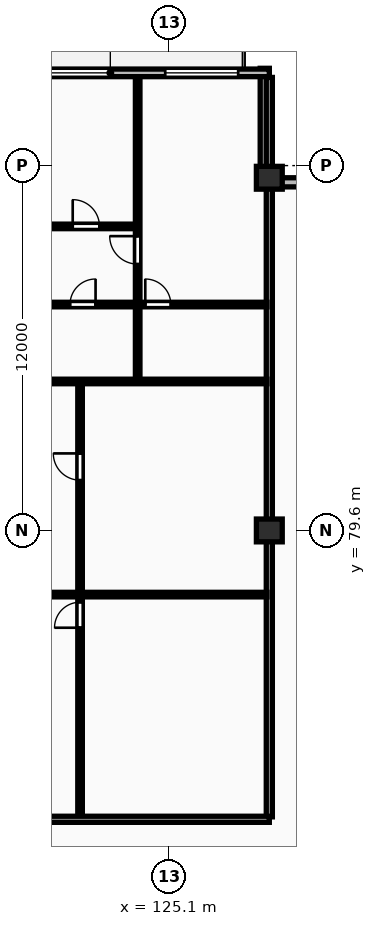
"""IFC4 building model, lengths in metres.
Left out: names, types, materials, properties, quantities, classifications, styles, units other than length and angle.
Written with IfcOpenShell. Run it as: python <this file> out.ifc"""

import sys

from ifc_helpers import new_model, si_unit, direction, frame, frame_2d, origin, origin_2d, place, context, subcontext, project, spatial, rectangle, extrude, element, fill, save


model = new_model("IFC4")
c1 = context("Model", 3, precision=1e-05, world=origin(), true_north=direction((0.0, 1.0)))
c2 = subcontext(c1, "Body", "Model", "MODEL_VIEW")
j1 = project(units=[si_unit("LENGTHUNIT", "METRE"), si_unit("PLANEANGLEUNIT", "RADIAN")], contexts=[c1])
p1 = place(None, origin())
s1 = spatial("IfcSite", under=j1, at=p1, CompositionType="ELEMENT")
p2 = place(p1, origin())
s2 = spatial("IfcBuilding", under=s1, at=p2, CompositionType="ELEMENT")
p3 = place(p2, frame((0.0, 0.0, 207.6)))
s3 = spatial("IfcBuildingStorey", under=s2, at=p3, CompositionType="ELEMENT", Elevation=207.6)
for number, where, z_axis, x_axis in (
    (1, (128.4, 79.6, 0.0), (0.0, 0.0, 1.0), (1.0, 0.0, 0.0)),
    (2, (128.4, 91.2, 0.0), (0.0, 0.0, 1.0), (1.0, 0.0, 0.0)),
):
    element("IfcColumn", number, at=place(p3, frame(where, z_axis=z_axis, x_axis=x_axis)), inside=s3, PredefinedType="COLUMN", context=c2, shape_type="SweptSolid", body=[
        extrude(rectangle(XDim=0.85, YDim=0.75, at=origin_2d()), origin(), (0.0, 0.0, 1.0), 3.25),
    ])
for number, where, z_axis, x_axis in (
    (3, (132.0, 91.05, 0.0), (0.0, 0.0, 1.0), (-1.0, 0.0, 0.0)),
    (4, (128.25, 91.2, 0.0), (0.0, 0.0, 1.0), (0.0, 1.0, 0.0)),
):
    element("IfcWall", number, at=place(p3, frame(where, z_axis=z_axis, x_axis=x_axis)), inside=s3, PredefinedType="STANDARD", context=c2, shape_type="SweptSolid", body=[
        extrude(rectangle(XDim=3.6, YDim=0.3, at=frame_2d((1.8, 0.0))), origin(), (0.0, 0.0, 1.0), 2.97),
    ])
p4 = place(p3, frame((128.4, 94.65, 0.0), z_axis=(0.0, 0.0, 1.0), x_axis=(-1.0, 0.0, 0.0)))
e5 = element("IfcWall", 5, at=p4, inside=s3, PredefinedType="STANDARD", context=c2, shape_type="SweptSolid", body=[
    extrude(rectangle(XDim=68.6, YDim=0.25, at=frame_2d((34.3, 0.0))), origin(), (0.0, 0.0, 1.0), 2.97),
])
p5 = place(p4, frame((62.6, 0.0, 0.0)))
e6 = element("IfcOpeningElement", 6, at=p5, cuts=e5, PredefinedType="OPENING", context=c2, shape_type="SweptSolid", body=[
    extrude(rectangle(XDim=1.8, YDim=2.2, at=frame_2d((0.9, 1.1))), frame((0.0, 0.135, 0.0), z_axis=(0.0, -1.0, 0.0), x_axis=(1.0, 0.0, 0.0)), (0.0, 0.0, 1.0), 0.27),
])
p6 = place(p4, frame((56.252, 0.0, 0.85)))
e7 = element("IfcOpeningElement", 7, at=p6, cuts=e5, PredefinedType="OPENING", context=c2, shape_type="SweptSolid", body=[
    extrude(rectangle(XDim=1.8, YDim=1.8, at=frame_2d((0.9, 0.9))), frame((0.0, 0.135, 0.0), z_axis=(0.0, -1.0, 0.0), x_axis=(1.0, 0.0, 0.0)), (0.0, 0.0, 1.0), 0.27),
])
p7 = place(p4, frame((49.882, 0.0, 0.0)))
e8 = element("IfcOpeningElement", 8, at=p7, cuts=e5, PredefinedType="OPENING", context=c2, shape_type="SweptSolid", body=[
    extrude(rectangle(XDim=1.8, YDim=2.2, at=frame_2d((0.9, 1.1))), frame((0.0, 0.135, 0.0), z_axis=(0.0, -1.0, 0.0), x_axis=(1.0, 0.0, 0.0)), (0.0, 0.0, 1.0), 0.27),
])
p8 = place(p4, frame((43.47, 0.0, 0.85)))
e9 = element("IfcOpeningElement", 9, at=p8, cuts=e5, PredefinedType="OPENING", context=c2, shape_type="SweptSolid", body=[
    extrude(rectangle(XDim=1.8, YDim=1.8, at=frame_2d((0.9, 0.9))), frame((0.0, 0.135, 0.0), z_axis=(0.0, -1.0, 0.0), x_axis=(1.0, 0.0, 0.0)), (0.0, 0.0, 1.0), 0.27),
])
p9 = place(p4, frame((36.75, 0.0, 0.0)))
e10 = element("IfcOpeningElement", 10, at=p9, cuts=e5, PredefinedType="OPENING", context=c2, shape_type="SweptSolid", body=[
    extrude(rectangle(XDim=1.8, YDim=2.2, at=frame_2d((0.9, 1.1))), frame((0.0, 0.135, 0.0), z_axis=(0.0, -1.0, 0.0), x_axis=(1.0, 0.0, 0.0)), (0.0, 0.0, 1.0), 0.27),
])
p10 = place(p4, frame((30.402, 0.0, 0.85)))
e11 = element("IfcOpeningElement", 11, at=p10, cuts=e5, PredefinedType="OPENING", context=c2, shape_type="SweptSolid", body=[
    extrude(rectangle(XDim=1.8, YDim=1.8, at=frame_2d((0.9, 0.9))), frame((0.0, 0.135, 0.0), z_axis=(0.0, -1.0, 0.0), x_axis=(1.0, 0.0, 0.0)), (0.0, 0.0, 1.0), 0.27),
])
p11 = place(p4, frame((23.882, 0.0, 0.0)))
e12 = element("IfcOpeningElement", 12, at=p11, cuts=e5, PredefinedType="OPENING", context=c2, shape_type="SweptSolid", body=[
    extrude(rectangle(XDim=1.8, YDim=2.2, at=frame_2d((0.9, 1.1))), frame((0.0, 0.135, 0.0), z_axis=(0.0, -1.0, 0.0), x_axis=(1.0, 0.0, 0.0)), (0.0, 0.0, 1.0), 0.27),
])
p12 = place(p4, frame((17.47, 0.0, 0.85)))
e13 = element("IfcOpeningElement", 13, at=p12, cuts=e5, PredefinedType="OPENING", context=c2, shape_type="SweptSolid", body=[
    extrude(rectangle(XDim=1.8, YDim=1.8, at=frame_2d((0.9, 0.9))), frame((0.0, 0.135, 0.0), z_axis=(0.0, -1.0, 0.0), x_axis=(1.0, 0.0, 0.0)), (0.0, 0.0, 1.0), 0.27),
])
p13 = place(p4, frame((9.48, 0.0, 0.85)))
e14 = element("IfcOpeningElement", 14, at=p13, cuts=e5, PredefinedType="OPENING", context=c2, shape_type="SweptSolid", body=[
    extrude(rectangle(XDim=1.8, YDim=1.8, at=frame_2d((0.9, 0.9))), frame((0.0, 0.135, 0.0), z_axis=(0.0, -1.0, 0.0), x_axis=(1.0, 0.0, 0.0)), (0.0, 0.0, 1.0), 0.27),
])
p14 = place(p4, frame((5.23, 0.0, 0.85)))
e15 = element("IfcOpeningElement", 15, at=p14, cuts=e5, PredefinedType="OPENING", context=c2, shape_type="SweptSolid", body=[
    extrude(rectangle(XDim=2.4, YDim=1.9, at=frame_2d((1.2, 0.95))), frame((0.0, 0.135, 0.0), z_axis=(0.0, -1.0, 0.0), x_axis=(1.0, 0.0, 0.0)), (0.0, 0.0, 1.0), 0.27),
])
p15 = place(p4, frame((13.455, 0.0, 0.0)))
e16 = element("IfcOpeningElement", 16, at=p15, cuts=e5, PredefinedType="OPENING", context=c2, shape_type="SweptSolid", body=[
    extrude(rectangle(XDim=1.8, YDim=2.2, at=frame_2d((0.9, 1.1))), frame((0.0, 0.135, 0.0), z_axis=(0.0, -1.0, 0.0), x_axis=(1.0, 0.0, 0.0)), (0.0, 0.0, 1.0), 0.27),
])
p16 = place(p4, frame((1.025, 0.0, 0.85)))
e17 = element("IfcOpeningElement", 17, at=p16, cuts=e5, PredefinedType="OPENING", context=c2, shape_type="SweptSolid", body=[
    extrude(rectangle(XDim=2.4, YDim=1.9, at=frame_2d((1.2, 0.95))), frame((0.0, 0.135, 0.0), z_axis=(0.0, -1.0, 0.0), x_axis=(1.0, 0.0, 0.0)), (0.0, 0.0, 1.0), 0.27),
])
p17 = place(p3, frame((128.4, 70.18, 0.0), z_axis=(0.0, 0.0, 1.0), x_axis=(0.0, 1.0, 0.0)))
e18 = element("IfcWall", 18, at=p17, inside=s3, PredefinedType="PARTITIONING", context=c2, shape_type="SweptSolid", body=[
    extrude(rectangle(XDim=24.32, YDim=0.2, at=frame_2d((12.16, 0.0))), origin(), (0.0, 0.0, 1.0), 2.277),
])
p18 = place(p3, frame((122.175, 70.16, 0.0), z_axis=(0.0, 0.0, 1.0), x_axis=(0.0, 1.0, 0.0)))
e19 = element("IfcWall", 19, at=p18, inside=s3, PredefinedType="PARTITIONING", context=c2, shape_type="SweptSolid", body=[
    extrude(rectangle(XDim=14.3, YDim=0.15, at=frame_2d((7.15, 0.0))), origin(), (0.0, 0.0, 1.0), 2.97),
])
p19 = place(p18, frame((6.24, 0.0, 0.0)))
e20 = element("IfcOpeningElement", 20, at=p19, cuts=e19, PredefinedType="OPENING", context=c2, shape_type="SweptSolid", body=[
    extrude(rectangle(XDim=0.84, YDim=2.04, at=frame_2d((0.42, 1.02))), frame((0.0, 0.085, 0.0), z_axis=(0.0, -1.0, 0.0), x_axis=(1.0, 0.0, 0.0)), (0.0, 0.0, 1.0), 0.17),
])
p20 = place(p18, frame((11.094, 0.0, 0.0)))
e21 = element("IfcOpeningElement", 21, at=p20, cuts=e19, PredefinedType="OPENING", context=c2, shape_type="SweptSolid", body=[
    extrude(rectangle(XDim=0.88, YDim=2.06, at=frame_2d((0.44, 1.03))), frame((0.0, 0.085, 0.0), z_axis=(0.0, -1.0, 0.0), x_axis=(1.0, 0.0, 0.0)), (0.0, 0.0, 1.0), 0.17),
])
p21 = place(p3, frame((115.83, 77.49, 0.0), z_axis=(0.0, 0.0, 1.0), x_axis=(1.0, 0.0, 0.0)))
e22 = element("IfcWall", 22, at=p21, inside=s3, PredefinedType="PARTITIONING", context=c2, shape_type="SweptSolid", body=[
    extrude(rectangle(XDim=12.49, YDim=0.15, at=frame_2d((6.245, 0.0))), origin(), (0.0, 0.0, 1.0), 2.97),
])
p22 = place(p21, frame((1.917, 0.0, 0.0)))
e23 = element("IfcOpeningElement", 23, at=p22, cuts=e22, PredefinedType="OPENING", context=c2, shape_type="SweptSolid", body=[
    extrude(rectangle(XDim=0.88, YDim=2.06, at=frame_2d((0.44, 1.03))), frame((0.0, 0.085, 0.0), z_axis=(0.0, -1.0, 0.0), x_axis=(1.0, 0.0, 0.0)), (0.0, 0.0, 1.0), 0.17),
])
p23 = place(p3, frame((124.07, 84.54, 0.0), z_axis=(0.0, 0.0, 1.0), x_axis=(0.0, 1.0, 0.0)))
e24 = element("IfcWall", 24, at=p23, inside=s3, PredefinedType="PARTITIONING", context=c2, shape_type="SweptSolid", body=[
    extrude(rectangle(XDim=2.47, YDim=0.15, at=frame_2d((1.235, 0.0))), origin(), (0.0, 0.0, 1.0), 2.97),
])
p24 = place(p3, frame((124.07, 87.05, 0.0), z_axis=(0.0, 0.0, 1.0), x_axis=(0.0, 1.0, 0.0)))
e25 = element("IfcWall", 25, at=p24, inside=s3, PredefinedType="PARTITIONING", context=c2, shape_type="SweptSolid", body=[
    extrude(rectangle(XDim=7.45, YDim=0.15, at=frame_2d((3.725, 0.0))), origin(), (0.0, 0.0, 1.0), 2.97),
])
p25 = place(p24, frame((1.31, 0.0, 0.0)))
e26 = element("IfcOpeningElement", 26, at=p25, cuts=e25, PredefinedType="OPENING", context=c2, shape_type="SweptSolid", body=[
    extrude(rectangle(XDim=0.92, YDim=2.08, at=frame_2d((0.46, 1.04))), frame((0.0, 0.085, 0.0), z_axis=(0.0, -1.0, 0.0), x_axis=(1.0, 0.0, 0.0)), (0.0, 0.0, 1.0), 0.17),
])
p26 = place(p3, frame((116.21, 87.03, 0.0), z_axis=(0.0, 0.0, 1.0), x_axis=(1.0, 0.0, 0.0)))
e27 = element("IfcWall", 27, at=p26, inside=s3, PredefinedType="PARTITIONING", context=c2, shape_type="SweptSolid", body=[
    extrude(rectangle(XDim=12.11, YDim=0.15, at=frame_2d((6.055, 0.0))), origin(), (0.0, 0.0, 1.0), 2.97),
])
p27 = place(p26, frame((1.21, 0.0, 0.0)))
e28 = element("IfcOpeningElement", 28, at=p27, cuts=e27, PredefinedType="OPENING", context=c2, shape_type="SweptSolid", body=[
    extrude(rectangle(XDim=0.84, YDim=2.04, at=frame_2d((0.42, 1.02))), frame((0.0, 0.085, 0.0), z_axis=(0.0, -1.0, 0.0), x_axis=(1.0, 0.0, 0.0)), (0.0, 0.0, 1.0), 0.17),
])
p28 = place(p26, frame((5.635, 0.0, 0.0)))
e29 = element("IfcOpeningElement", 29, at=p28, cuts=e27, PredefinedType="OPENING", context=c2, shape_type="SweptSolid", body=[
    extrude(rectangle(XDim=0.84, YDim=2.04, at=frame_2d((0.42, 1.02))), frame((0.0, 0.085, 0.0), z_axis=(0.0, -1.0, 0.0), x_axis=(1.0, 0.0, 0.0)), (0.0, 0.0, 1.0), 0.17),
])
p29 = place(p26, frame((8.11, 0.0, 0.0)))
e30 = element("IfcOpeningElement", 30, at=p29, cuts=e27, PredefinedType="OPENING", context=c2, shape_type="SweptSolid", body=[
    extrude(rectangle(XDim=0.84, YDim=2.04, at=frame_2d((0.42, 1.02))), frame((0.0, 0.085, 0.0), z_axis=(0.0, -1.0, 0.0), x_axis=(1.0, 0.0, 0.0)), (0.0, 0.0, 1.0), 0.17),
])
p30 = place(p3, frame((111.88, 84.5, 0.0), z_axis=(0.0, 0.0, 1.0), x_axis=(1.0, 0.0, 0.0)))
e31 = element("IfcWall", 31, at=p30, inside=s3, PredefinedType="PARTITIONING", context=c2, shape_type="SweptSolid", body=[
    extrude(rectangle(XDim=16.44, YDim=0.15, at=frame_2d((8.22, 0.0))), origin(), (0.0, 0.0, 1.0), 2.97),
])
p31 = place(p30, frame((2.72, 0.0, 0.0)))
e32 = element("IfcOpeningElement", 32, at=p31, cuts=e31, PredefinedType="OPENING", context=c2, shape_type="SweptSolid", body=[
    extrude(rectangle(XDim=0.92, YDim=2.08, at=frame_2d((0.46, 1.04))), frame((0.0, 0.085, 0.0), z_axis=(0.0, -1.0, 0.0), x_axis=(1.0, 0.0, 0.0)), (0.0, 0.0, 1.0), 0.17),
])
p32 = place(p3, frame((111.88, 89.6, 0.0), z_axis=(0.0, 0.0, 1.0), x_axis=(1.0, 0.0, 0.0)))
e33 = element("IfcWall", 33, at=p32, inside=s3, PredefinedType="PARTITIONING", context=c2, shape_type="SweptSolid", body=[
    extrude(rectangle(XDim=12.19, YDim=0.15, at=frame_2d((6.095, 0.0))), origin(), (0.0, 0.0, 1.0), 2.97),
])
p33 = place(p32, frame((3.1, 0.0, 0.0)))
e34 = element("IfcOpeningElement", 34, at=p33, cuts=e33, PredefinedType="OPENING", context=c2, shape_type="SweptSolid", body=[
    extrude(rectangle(XDim=0.94, YDim=2.1, at=frame_2d((0.47, 1.05))), frame((0.0, 0.085, 0.0), z_axis=(0.0, -1.0, 0.0), x_axis=(1.0, 0.0, 0.0)), (0.0, 0.0, 1.0), 0.17),
])
p34 = place(p32, frame((5.655, 0.0, 0.0)))
e35 = element("IfcOpeningElement", 35, at=p34, cuts=e33, PredefinedType="OPENING", context=c2, shape_type="SweptSolid", body=[
    extrude(rectangle(XDim=0.88, YDim=2.06, at=frame_2d((0.44, 1.03))), frame((0.0, 0.085, 0.0), z_axis=(0.0, -1.0, 0.0), x_axis=(1.0, 0.0, 0.0)), (0.0, 0.0, 1.0), 0.17),
])
p35 = place(p32, frame((10.053, 0.0, 0.0)))
e36 = element("IfcOpeningElement", 36, at=p35, cuts=e33, PredefinedType="OPENING", context=c2, shape_type="SweptSolid", body=[
    extrude(rectangle(XDim=0.88, YDim=2.06, at=frame_2d((0.44, 1.03))), frame((0.0, 0.085, 0.0), z_axis=(0.0, -1.0, 0.0), x_axis=(1.0, 0.0, 0.0)), (0.0, 0.0, 1.0), 0.17),
])
p36 = place(p3, frame((59.8, 70.1, 0.0), z_axis=(0.0, 0.0, 1.0), x_axis=(1.0, 0.0, 0.0)))
e37 = element("IfcWall", 37, at=p36, inside=s3, PredefinedType="PARTITIONING", context=c2, shape_type="SweptSolid", body=[
    extrude(rectangle(XDim=68.6, YDim=0.2, at=frame_2d((34.3, 0.0))), origin(), (0.0, 0.0, 1.0), 2.97),
])
p37 = place(p36, frame((2.045, 0.0, 0.0)))
e38 = element("IfcOpeningElement", 38, at=p37, cuts=e37, PredefinedType="OPENING", context=c2, shape_type="SweptSolid", body=[
    extrude(rectangle(XDim=0.95, YDim=2.15, at=frame_2d((0.475, 1.075))), frame((0.0, 0.11, 0.0), z_axis=(0.0, -1.0, 0.0), x_axis=(1.0, 0.0, 0.0)), (0.0, 0.0, 1.0), 0.22),
])
p38 = place(p36, frame((14.981, 0.0, 0.0)))
e39 = element("IfcOpeningElement", 39, at=p38, cuts=e37, PredefinedType="OPENING", context=c2, shape_type="SweptSolid", body=[
    extrude(rectangle(XDim=0.95, YDim=2.15, at=frame_2d((0.475, 1.075))), frame((0.0, 0.11, 0.0), z_axis=(0.0, -1.0, 0.0), x_axis=(1.0, 0.0, 0.0)), (0.0, 0.0, 1.0), 0.22),
])
p39 = place(p36, frame((28.045, 0.0, 0.0)))
e40 = element("IfcOpeningElement", 40, at=p39, cuts=e37, PredefinedType="OPENING", context=c2, shape_type="SweptSolid", body=[
    extrude(rectangle(XDim=0.95, YDim=2.15, at=frame_2d((0.475, 1.075))), frame((0.0, 0.11, 0.0), z_axis=(0.0, -1.0, 0.0), x_axis=(1.0, 0.0, 0.0)), (0.0, 0.0, 1.0), 0.22),
])
p40 = place(p36, frame((40.981, 0.0, 0.0)))
e41 = element("IfcOpeningElement", 41, at=p40, cuts=e37, PredefinedType="OPENING", context=c2, shape_type="SweptSolid", body=[
    extrude(rectangle(XDim=0.95, YDim=2.15, at=frame_2d((0.475, 1.075))), frame((0.0, 0.11, 0.0), z_axis=(0.0, -1.0, 0.0), x_axis=(1.0, 0.0, 0.0)), (0.0, 0.0, 1.0), 0.22),
])
p41 = place(p36, frame((54.045, 0.0, 0.0)))
e42 = element("IfcOpeningElement", 42, at=p41, cuts=e37, PredefinedType="OPENING", context=c2, shape_type="SweptSolid", body=[
    extrude(rectangle(XDim=0.95, YDim=2.15, at=frame_2d((0.475, 1.075))), frame((0.0, 0.11, 0.0), z_axis=(0.0, -1.0, 0.0), x_axis=(1.0, 0.0, 0.0)), (0.0, 0.0, 1.0), 0.22),
])
p42 = place(p14, origin())
e43 = element("IfcWindow", 43, at=p42, inside=s3, PartitioningType="DOUBLE_PANEL_VERTICAL", PredefinedType="WINDOW", context=c2, shape_type="SweptSolid", body=[
    extrude(rectangle(XDim=2.4, YDim=1.9, at=frame_2d((1.2, 0.95))), frame((0.0, 0.03, 0.0), z_axis=(0.0, -1.0, 0.0), x_axis=(1.0, 0.0, 0.0)), (0.0, 0.0, 1.0), 0.06),
])
fill(e15, e43)
p43 = place(p16, origin())
e44 = element("IfcWindow", 44, at=p43, inside=s3, PartitioningType="DOUBLE_PANEL_VERTICAL", PredefinedType="WINDOW", context=c2, shape_type="SweptSolid", body=[
    extrude(rectangle(XDim=2.4, YDim=1.9, at=frame_2d((1.2, 0.95))), frame((0.0, 0.03, 0.0), z_axis=(0.0, -1.0, 0.0), x_axis=(1.0, 0.0, 0.0)), (0.0, 0.0, 1.0), 0.06),
])
fill(e17, e44)
p44 = place(p19, origin())
e45 = element("IfcDoor", 45, at=p44, inside=s3, OperationType="SINGLE_SWING_LEFT", PredefinedType="DOOR", context=c2, shape_type="SweptSolid", body=[
    extrude(rectangle(XDim=0.84, YDim=2.04, at=frame_2d((0.42, 1.02))), frame((0.0, 0.025, 0.0), z_axis=(0.0, -1.0, 0.0), x_axis=(1.0, 0.0, 0.0)), (0.0, 0.0, 1.0), 0.05),
])
fill(e20, e45)
p45 = place(p20, origin())
e46 = element("IfcDoor", 46, at=p45, inside=s3, OperationType="SINGLE_SWING_RIGHT", PredefinedType="DOOR", context=c2, shape_type="SweptSolid", body=[
    extrude(rectangle(XDim=0.88, YDim=2.06, at=frame_2d((0.44, 1.03))), frame((0.0, 0.025, 0.0), z_axis=(0.0, -1.0, 0.0), x_axis=(1.0, 0.0, 0.0)), (0.0, 0.0, 1.0), 0.05),
])
fill(e21, e46)
p46 = place(p25, origin())
e47 = element("IfcDoor", 47, at=p46, inside=s3, OperationType="SINGLE_SWING_RIGHT", PredefinedType="DOOR", context=c2, shape_type="SweptSolid", body=[
    extrude(rectangle(XDim=0.92, YDim=2.08, at=frame_2d((0.46, 1.04))), frame((0.0, 0.025, 0.0), z_axis=(0.0, -1.0, 0.0), x_axis=(1.0, 0.0, 0.0)), (0.0, 0.0, 1.0), 0.05),
])
fill(e26, e47)
p47 = place(p28, origin())
e48 = element("IfcDoor", 48, at=p47, inside=s3, OperationType="SINGLE_SWING_RIGHT", PredefinedType="DOOR", context=c2, shape_type="SweptSolid", body=[
    extrude(rectangle(XDim=0.84, YDim=2.04, at=frame_2d((0.42, 1.02))), frame((0.0, 0.025, 0.0), z_axis=(0.0, -1.0, 0.0), x_axis=(1.0, 0.0, 0.0)), (0.0, 0.0, 1.0), 0.05),
])
fill(e29, e48)
p48 = place(p29, origin())
e49 = element("IfcDoor", 49, at=p48, inside=s3, OperationType="SINGLE_SWING_LEFT", PredefinedType="DOOR", context=c2, shape_type="SweptSolid", body=[
    extrude(rectangle(XDim=0.84, YDim=2.04, at=frame_2d((0.42, 1.02))), frame((0.0, 0.025, 0.0), z_axis=(0.0, -1.0, 0.0), x_axis=(1.0, 0.0, 0.0)), (0.0, 0.0, 1.0), 0.05),
])
fill(e30, e49)
p49 = place(p35, origin())
e50 = element("IfcDoor", 50, at=p49, inside=s3, OperationType="SINGLE_SWING_LEFT", PredefinedType="DOOR", context=c2, shape_type="SweptSolid", body=[
    extrude(rectangle(XDim=0.88, YDim=2.06, at=frame_2d((0.44, 1.03))), frame((0.0, 0.025, 0.0), z_axis=(0.0, -1.0, 0.0), x_axis=(1.0, 0.0, 0.0)), (0.0, 0.0, 1.0), 0.05),
])
fill(e36, e50)
save(model, sys.argv[1])
